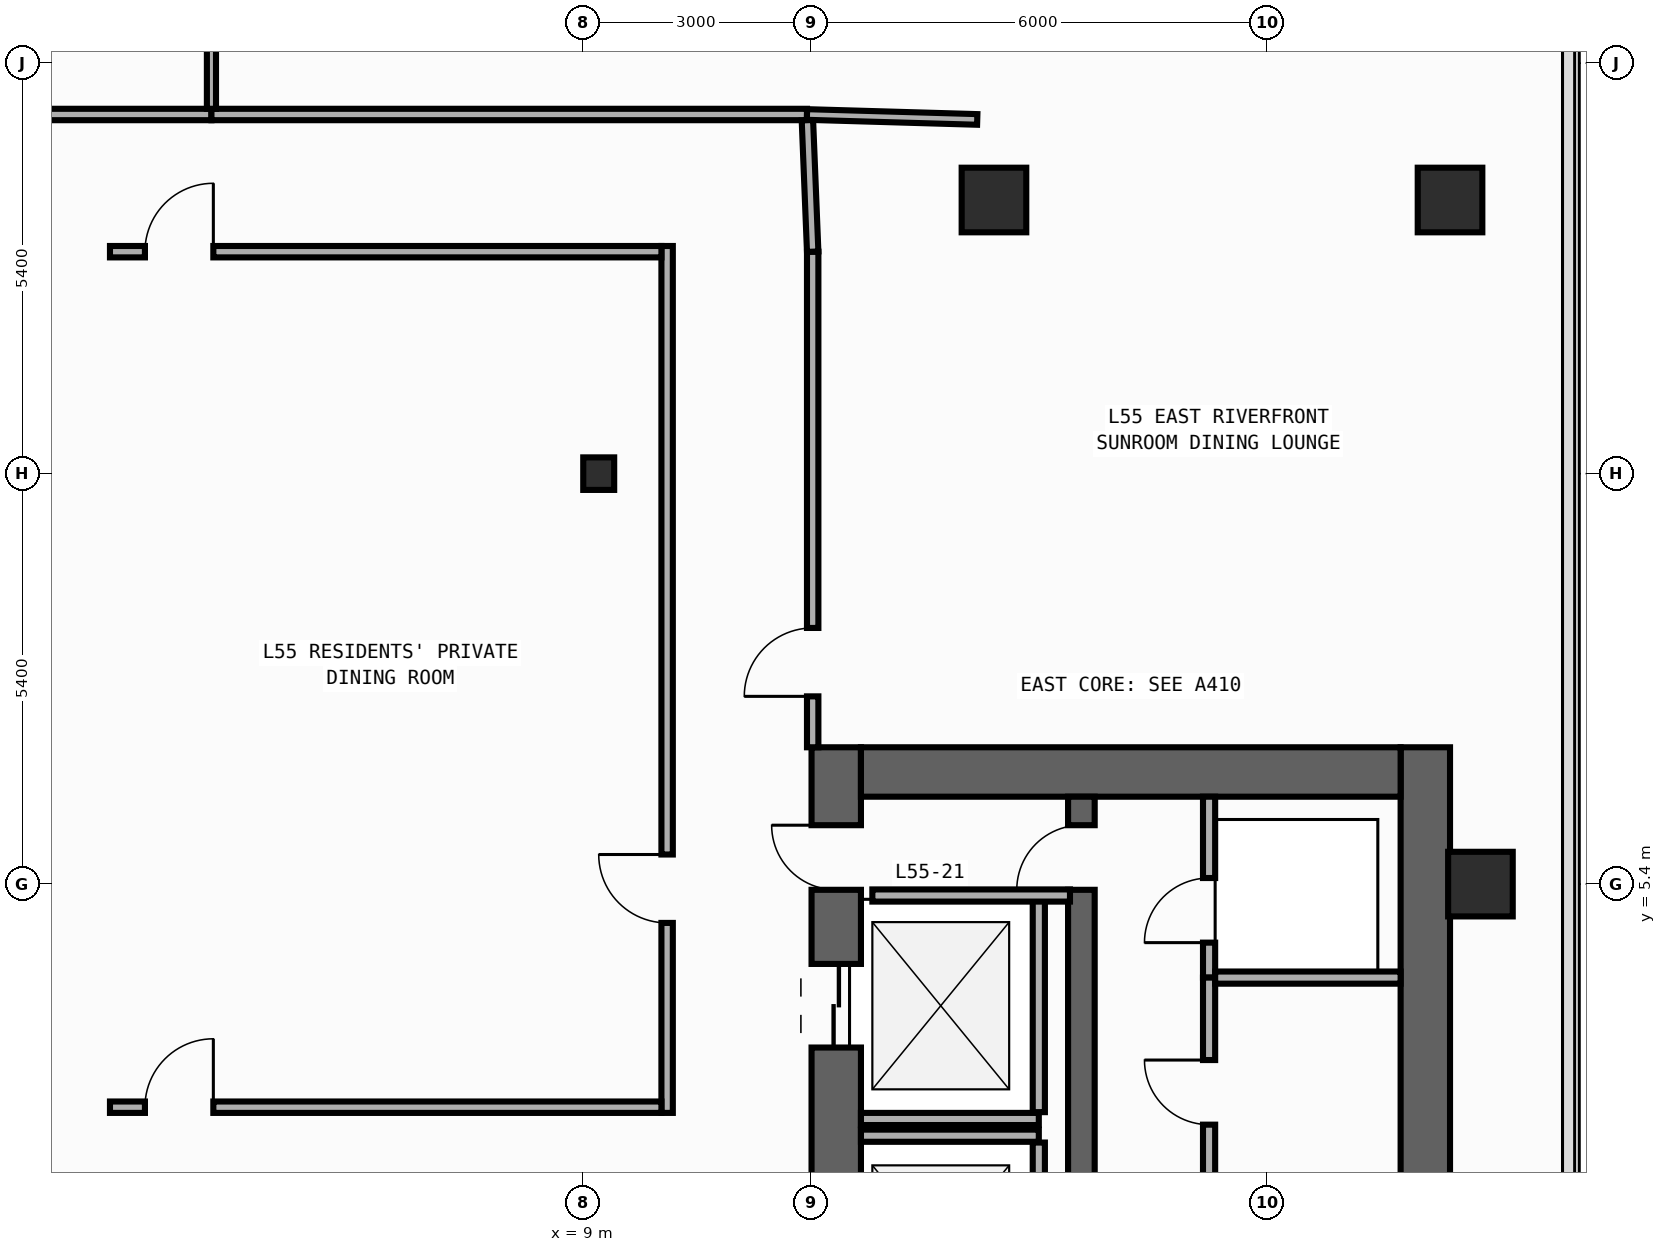
"""IFC4 building model, lengths in metres.
Left out: names, types, materials, properties, quantities, classifications, styles, units other than length and angle.
Written with IfcOpenShell. Run it as: python <this file> out.ifc"""

import sys

from ifc_helpers import new_model, si_unit, direction, frame, frame_2d, origin, origin_2d, place, context, subcontext, project, spatial, rectangle, i_section, extrude, element, fill, save


model = new_model("IFC4")
c1 = context("Model", 3, precision=1e-05, world=origin(), true_north=direction((0.0, 1.0)))
c2 = subcontext(c1, "Body", "Model", "MODEL_VIEW")
j1 = project(units=[si_unit("LENGTHUNIT", "METRE"), si_unit("PLANEANGLEUNIT", "RADIAN")], contexts=[c1])
p1 = place(None, origin())
s1 = spatial("IfcSite", under=j1, at=p1, CompositionType="ELEMENT")
p2 = place(p1, origin())
s2 = spatial("IfcBuilding", under=s1, at=p2, CompositionType="ELEMENT")
p3 = place(p2, frame((0.0, 0.0, 236.8)))
s3 = spatial("IfcBuildingStorey", under=s2, at=p3, CompositionType="ELEMENT", Elevation=236.8)
p4 = place(p3, frame((12.325, -19.8, 0.0), z_axis=(0.0, 0.0, 1.0), x_axis=(0.0, 1.0, 0.0)))
e1 = element("IfcWall", 1, at=p4, inside=s3, PredefinedType="SHEAR", context=c2, shape_type="SweptSolid", body=[
    extrude(rectangle(XDim=27.0, YDim=0.65, at=frame_2d((13.5, 0.0))), origin(), (0.0, 0.0, 1.0), 3.34),
])
p5 = place(p4, frame((23.05, 0.0, 0.0)))
e2 = element("IfcOpeningElement", 2, at=p5, cuts=e1, PredefinedType="OPENING", context=c2, shape_type="SweptSolid", body=[
    extrude(rectangle(XDim=1.1, YDim=2.2, at=frame_2d((0.55, 1.1))), frame((0.0, 0.335, 0.0), z_axis=(0.0, -1.0, 0.0), x_axis=(1.0, 0.0, 0.0)), (0.0, 0.0, 1.0), 0.67),
])
p6 = place(p4, frame((19.85, 0.0, 0.0)))
e3 = element("IfcOpeningElement", 3, at=p6, cuts=e1, PredefinedType="OPENING", context=c2, shape_type="SweptSolid", body=[
    extrude(rectangle(XDim=1.1, YDim=2.2, at=frame_2d((0.55, 1.1))), frame((0.0, 0.335, 0.0), z_axis=(0.0, -1.0, 0.0), x_axis=(1.0, 0.0, 0.0)), (0.0, 0.0, 1.0), 0.67),
])
p7 = place(p4, frame((16.65, 0.0, 0.0)))
e4 = element("IfcOpeningElement", 4, at=p7, cuts=e1, PredefinedType="OPENING", context=c2, shape_type="SweptSolid", body=[
    extrude(rectangle(XDim=1.1, YDim=2.2, at=frame_2d((0.55, 1.1))), frame((0.0, 0.335, 0.0), z_axis=(0.0, -1.0, 0.0), x_axis=(1.0, 0.0, 0.0)), (0.0, 0.0, 1.0), 0.67),
])
p8 = place(p4, frame((10.175, 0.0, 0.0)))
e5 = element("IfcOpeningElement", 5, at=p8, cuts=e1, PredefinedType="OPENING", context=c2, shape_type="SweptSolid", body=[
    extrude(rectangle(XDim=0.85, YDim=2.1, at=frame_2d((0.425, 1.05))), frame((0.0, 0.335, 0.0), z_axis=(0.0, -1.0, 0.0), x_axis=(1.0, 0.0, 0.0)), (0.0, 0.0, 1.0), 0.67),
])
p9 = place(p4, frame((12.725, 0.0, 0.0)))
e6 = element("IfcOpeningElement", 6, at=p9, cuts=e1, PredefinedType="OPENING", context=c2, shape_type="SweptSolid", body=[
    extrude(rectangle(XDim=1.15, YDim=2.2, at=frame_2d((0.575, 1.1))), frame((0.0, 0.335, 0.0), z_axis=(0.0, -1.0, 0.0), x_axis=(1.0, 0.0, 0.0)), (0.0, 0.0, 1.0), 0.67),
])
p10 = place(p4, frame((25.125, 0.0, 0.0)))
e7 = element("IfcOpeningElement", 7, at=p10, cuts=e1, PredefinedType="OPENING", context=c2, shape_type="SweptSolid", body=[
    extrude(rectangle(XDim=0.85, YDim=2.1, at=frame_2d((0.425, 1.05))), frame((0.0, 0.335, 0.0), z_axis=(0.0, -1.0, 0.0), x_axis=(1.0, 0.0, 0.0)), (0.0, 0.0, 1.0), 0.67),
])
p11 = place(p3, frame((20.075, -19.8, 0.0), z_axis=(0.0, 0.0, 1.0), x_axis=(0.0, 1.0, 0.0)))
e8 = element("IfcWall", 8, at=p11, inside=s3, PredefinedType="SHEAR", context=c2, shape_type="SweptSolid", body=[
    extrude(rectangle(XDim=27.0, YDim=0.65, at=frame_2d((13.5, 0.0))), origin(), (0.0, 0.0, 1.0), 3.34),
])
p12 = place(p3, frame((12.65, 6.875, 0.0), z_axis=(0.0, 0.0, 1.0), x_axis=(1.0, 0.0, 0.0)))
e9 = element("IfcWall", 9, at=p12, inside=s3, PredefinedType="SHEAR", context=c2, shape_type="SweptSolid", body=[
    extrude(rectangle(XDim=7.1, YDim=0.65, at=frame_2d((3.55, 0.0))), origin(), (0.0, 0.0, 1.0), 3.34),
])
p13 = place(p3, frame((15.55, -19.15, 0.0), z_axis=(0.0, 0.0, 1.0), x_axis=(0.0, 1.0, 0.0)))
e10 = element("IfcWall", 10, at=p13, inside=s3, PredefinedType="SHEAR", context=c2, shape_type="SweptSolid", body=[
    extrude(rectangle(XDim=25.7, YDim=0.35, at=frame_2d((12.85, 0.0))), origin(), (0.0, 0.0, 1.0), 3.34),
])
p14 = place(p13, frame((12.075, 0.0, 0.0)))
e11 = element("IfcOpeningElement", 11, at=p14, cuts=e10, PredefinedType="OPENING", context=c2, shape_type="SweptSolid", body=[
    extrude(rectangle(XDim=1.15, YDim=2.2, at=frame_2d((0.575, 1.1))), frame((0.0, 0.185, 0.0), z_axis=(0.0, -1.0, 0.0), x_axis=(1.0, 0.0, 0.0)), (0.0, 0.0, 1.0), 0.37),
])
p15 = place(p13, frame((24.475, 0.0, 0.0)))
e12 = element("IfcOpeningElement", 12, at=p15, cuts=e10, PredefinedType="OPENING", context=c2, shape_type="SweptSolid", body=[
    extrude(rectangle(XDim=0.85, YDim=2.1, at=frame_2d((0.425, 1.05))), frame((0.0, 0.185, 0.0), z_axis=(0.0, -1.0, 0.0), x_axis=(1.0, 0.0, 0.0)), (0.0, 0.0, 1.0), 0.37),
])
p16 = place(p3, frame((9.2, 10.8, 0.0), z_axis=(0.0, 0.0, 1.0), x_axis=(1.0, 0.0, 0.0)))
e13 = element("IfcColumn", 13, at=p16, inside=s3, PredefinedType="COLUMN", context=c2, shape_type="SweptSolid", body=[
    extrude(i_section(OverallWidth=0.407, OverallDepth=0.428, WebThickness=0.02, FlangeThickness=0.035, FilletRadius=0.022, at=origin_2d()), origin(), (0.0, 0.0, 1.0), 3.6),
])
for number, where, z_axis, x_axis in (
    (14, (20.4, 14.4, 0.0), (0.0, 0.0, 1.0), (1.0, 0.0, 0.0)),
    (15, (14.4, 14.4, 0.0), (0.0, 0.0, 1.0), (1.0, 0.0, 0.0)),
    (16, (20.8, 5.4, 0.0), (0.0, 0.0, 1.0), (1.0, 0.0, 0.0)),
):
    element("IfcColumn", number, at=place(p3, frame(where, z_axis=z_axis, x_axis=x_axis)), inside=s3, PredefinedType="COLUMN", context=c2, shape_type="SweptSolid", body=[
        extrude(rectangle(XDim=0.85, YDim=0.85, at=origin_2d()), origin(), (0.0, 0.0, 1.0), 3.6),
    ])
p17 = place(p3, frame((12.65, 2.31, 0.0), z_axis=(0.0, 0.0, 1.0), x_axis=(1.0, 0.0, 0.0)))
e17 = element("IfcWall", 17, at=p17, inside=s3, PredefinedType="STANDARD", context=c2, shape_type="SweptSolid", body=[
    extrude(rectangle(XDim=2.34, YDim=0.16, at=frame_2d((1.17, 0.0))), origin(), (0.0, 0.0, 1.0), 3.34),
])
p18 = place(p3, frame((14.99, 2.4, 0.0), z_axis=(0.0, 0.0, 1.0), x_axis=(0.0, 1.0, 0.0)))
e18 = element("IfcWall", 18, at=p18, inside=s3, PredefinedType="STANDARD", context=c2, shape_type="SweptSolid", body=[
    extrude(rectangle(XDim=2.8, YDim=0.16, at=frame_2d((1.4, 0.0))), origin(), (0.0, 0.0, 1.0), 3.34),
])
p19 = place(p3, frame((12.65, 2.09, 0.0), z_axis=(0.0, 0.0, 1.0), x_axis=(1.0, 0.0, 0.0)))
e19 = element("IfcWall", 19, at=p19, inside=s3, PredefinedType="STANDARD", context=c2, shape_type="SweptSolid", body=[
    extrude(rectangle(XDim=2.34, YDim=0.16, at=frame_2d((1.17, 0.0))), origin(), (0.0, 0.0, 1.0), 3.34),
])
p20 = place(p3, frame((14.99, -0.8, 0.0), z_axis=(0.0, 0.0, 1.0), x_axis=(0.0, 1.0, 0.0)))
e20 = element("IfcWall", 20, at=p20, inside=s3, PredefinedType="STANDARD", context=c2, shape_type="SweptSolid", body=[
    extrude(rectangle(XDim=2.8, YDim=0.16, at=frame_2d((1.4, 0.0))), origin(), (0.0, 0.0, 1.0), 3.34),
])
p21 = place(p3, frame((12.8, 5.25, 0.0), z_axis=(0.0, 0.0, 1.0), x_axis=(1.0, 0.0, 0.0)))
e21 = element("IfcWall", 21, at=p21, inside=s3, PredefinedType="STANDARD", context=c2, shape_type="SweptSolid", body=[
    extrude(rectangle(XDim=2.6, YDim=0.16, at=frame_2d((1.3, 0.0))), origin(), (0.0, 0.0, 1.0), 3.34),
])
p22 = place(p3, frame((17.23, 4.17, 0.0), z_axis=(0.0, 0.0, 1.0), x_axis=(0.0, 1.0, 0.0)))
e22 = element("IfcWall", 22, at=p22, inside=s3, PredefinedType="PARTITIONING", context=c2, shape_type="SweptSolid", body=[
    extrude(rectangle(XDim=2.38, YDim=0.16, at=frame_2d((1.19, 0.0))), origin(), (0.0, 0.0, 1.0), 3.34),
])
p23 = place(p22, frame((0.46, 0.0, 0.0)))
e23 = element("IfcOpeningElement", 23, at=p23, cuts=e22, PredefinedType="OPENING", context=c2, shape_type="SweptSolid", body=[
    extrude(rectangle(XDim=0.85, YDim=2.1, at=frame_2d((0.425, 1.05))), frame((0.0, 0.09, 0.0), z_axis=(0.0, -1.0, 0.0), x_axis=(1.0, 0.0, 0.0)), (0.0, 0.0, 1.0), 0.18),
])
p24 = place(p3, frame((17.23, -1.14, 0.0), z_axis=(0.0, 0.0, 1.0), x_axis=(0.0, 1.0, 0.0)))
e24 = element("IfcWall", 24, at=p24, inside=s3, PredefinedType="PARTITIONING", context=c2, shape_type="SweptSolid", body=[
    extrude(rectangle(XDim=5.31, YDim=0.16, at=frame_2d((2.655, 0.0))), origin(), (0.0, 0.0, 1.0), 3.34),
])
p25 = place(p24, frame((3.375, 0.0, 0.0)))
e25 = element("IfcOpeningElement", 25, at=p25, cuts=e24, PredefinedType="OPENING", context=c2, shape_type="SweptSolid", body=[
    extrude(rectangle(XDim=0.85, YDim=2.1, at=frame_2d((0.425, 1.05))), frame((0.0, 0.09, 0.0), z_axis=(0.0, -1.0, 0.0), x_axis=(1.0, 0.0, 0.0)), (0.0, 0.0, 1.0), 0.18),
])
p26 = place(p3, frame((17.31, 4.17, 0.0), z_axis=(0.0, 0.0, 1.0), x_axis=(1.0, 0.0, 0.0)))
e26 = element("IfcWall", 26, at=p26, inside=s3, PredefinedType="PARTITIONING", context=c2, shape_type="SweptSolid", body=[
    extrude(rectangle(XDim=2.44, YDim=0.16, at=frame_2d((1.22, 0.0))), origin(), (0.0, 0.0, 1.0), 3.34),
])
p27 = place(p3, frame((12.015, 7.2, 0.0), z_axis=(0.0, 0.0, 1.0), x_axis=(0.0, 1.0, 0.0)))
e27 = element("IfcWall", 27, at=p27, inside=s3, PredefinedType="PARTITIONING", context=c2, shape_type="SweptSolid", body=[
    extrude(rectangle(XDim=6.52, YDim=0.15, at=frame_2d((3.26, 0.0))), origin(), (0.0, 0.0, 1.0), 3.34),
])
p28 = place(p27, frame((0.67, 0.0, 0.0)))
e28 = element("IfcOpeningElement", 28, at=p28, cuts=e27, PredefinedType="OPENING", context=c2, shape_type="SweptSolid", body=[
    extrude(rectangle(XDim=0.9, YDim=2.15, at=frame_2d((0.45, 1.075))), frame((0.0, 0.085, 0.0), z_axis=(0.0, -1.0, 0.0), x_axis=(1.0, 0.0, 0.0)), (0.0, 0.0, 1.0), 0.17),
])
p29 = place(p3, frame((10.1, 2.39, 0.0), z_axis=(0.0, 0.0, 1.0), x_axis=(0.0, 1.0, 0.0)))
e29 = element("IfcWall", 29, at=p29, inside=s3, PredefinedType="PARTITIONING", context=c2, shape_type="SweptSolid", body=[
    extrude(rectangle(XDim=11.405, YDim=0.15, at=frame_2d((5.703, 0.0))), origin(), (0.0, 0.0, 1.0), 3.34),
])
p30 = place(p29, frame((2.5, 0.0, 0.0)))
e30 = element("IfcOpeningElement", 30, at=p30, cuts=e29, PredefinedType="OPENING", context=c2, shape_type="SweptSolid", body=[
    extrude(rectangle(XDim=0.9, YDim=2.15, at=frame_2d((0.45, 1.075))), frame((0.0, 0.085, 0.0), z_axis=(0.0, -1.0, 0.0), x_axis=(1.0, 0.0, 0.0)), (0.0, 0.0, 1.0), 0.17),
])
p31 = place(p3, frame((2.77, 2.465, 0.0), z_axis=(0.0, 0.0, 1.0), x_axis=(1.0, 0.0, 0.0)))
e31 = element("IfcWall", 31, at=p31, inside=s3, PredefinedType="PARTITIONING", context=c2, shape_type="SweptSolid", body=[
    extrude(rectangle(XDim=7.255, YDim=0.15, at=frame_2d((3.627, 0.0))), origin(), (0.0, 0.0, 1.0), 3.34),
])
p32 = place(p31, frame((0.46, 0.0, 0.0)))
e32 = element("IfcOpeningElement", 32, at=p32, cuts=e31, PredefinedType="OPENING", context=c2, shape_type="SweptSolid", body=[
    extrude(rectangle(XDim=0.9, YDim=2.15, at=frame_2d((0.45, 1.075))), frame((0.0, 0.085, 0.0), z_axis=(0.0, -1.0, 0.0), x_axis=(1.0, 0.0, 0.0)), (0.0, 0.0, 1.0), 0.17),
])
p33 = place(p3, frame((-5.81, 15.525, 0.0), z_axis=(0.0, 0.0, 1.0), x_axis=(1.0, 0.0, 0.0)))
e33 = element("IfcWall", 33, at=p33, inside=s3, PredefinedType="PARTITIONING", context=c2, shape_type="SweptSolid", body=[
    extrude(rectangle(XDim=9.915, YDim=0.15, at=frame_2d((4.958, 0.0))), origin(), (0.0, 0.0, 1.0), 3.34),
])
p34 = place(p3, frame((4.105, 15.525, 0.0), z_axis=(0.0, 0.0, 1.0), x_axis=(1.0, 0.0, 0.0)))
e34 = element("IfcWall", 34, at=p34, inside=s3, PredefinedType="PARTITIONING", context=c2, shape_type="SweptSolid", body=[
    extrude(rectangle(XDim=7.835, YDim=0.15, at=frame_2d((3.917, 0.0))), origin(), (0.0, 0.0, 1.0), 3.34),
])
p35 = place(p3, frame((12.015, 13.72, 0.0), z_axis=(0.0, 0.0, 1.0), x_axis=(-0.040046877756, 0.99919780203, 0.0)))
e35 = element("IfcWall", 35, at=p35, inside=s3, PredefinedType="PARTITIONING", context=c2, shape_type="SweptSolid", body=[
    extrude(rectangle(XDim=1.731, YDim=0.15, at=frame_2d((0.866, 0.0))), origin(), (0.0, 0.0, 1.0), 3.34),
])
p36 = place(p3, frame((2.77, 13.72, 0.0), z_axis=(0.0, 0.0, 1.0), x_axis=(1.0, 0.0, 0.0)))
e36 = element("IfcWall", 36, at=p36, inside=s3, PredefinedType="PARTITIONING", context=c2, shape_type="SweptSolid", body=[
    extrude(rectangle(XDim=7.255, YDim=0.15, at=frame_2d((3.627, 0.0))), origin(), (0.0, 0.0, 1.0), 3.34),
])
p37 = place(p36, frame((0.46, 0.0, 0.0)))
e37 = element("IfcOpeningElement", 37, at=p37, cuts=e36, PredefinedType="OPENING", context=c2, shape_type="SweptSolid", body=[
    extrude(rectangle(XDim=0.9, YDim=2.15, at=frame_2d((0.45, 1.075))), frame((0.0, 0.085, 0.0), z_axis=(0.0, -1.0, 0.0), x_axis=(1.0, 0.0, 0.0)), (0.0, 0.0, 1.0), 0.17),
])
p38 = place(p3, frame((4.105, 15.6, 0.0), z_axis=(0.0, 0.0, 1.0), x_axis=(0.0, 1.0, 0.0)))
e38 = element("IfcWall", 38, at=p38, inside=s3, PredefinedType="PARTITIONING", context=c2, shape_type="SweptSolid", body=[
    extrude(rectangle(XDim=9.255, YDim=0.12, at=frame_2d((4.627, 0.0))), origin(), (0.0, 0.0, 1.0), 3.34),
])
p39 = place(p38, frame((7.995, 0.0, 0.0)))
e39 = element("IfcOpeningElement", 39, at=p39, cuts=e38, PredefinedType="OPENING", context=c2, shape_type="SweptSolid", body=[
    extrude(rectangle(XDim=0.8, YDim=2.1, at=frame_2d((0.4, 1.05))), frame((0.0, 0.07, 0.0), z_axis=(0.0, -1.0, 0.0), x_axis=(1.0, 0.0, 0.0)), (0.0, 0.0, 1.0), 0.14),
])
p40 = place(p3, frame((11.94, 15.525, 0.0), z_axis=(0.0, 0.0, 1.0), x_axis=(0.99958000177, -0.028979649098, 0.0)))
e40 = element("IfcWall", 40, at=p40, inside=s3, PredefinedType="PARTITIONING", context=c2, shape_type="SweptSolid", body=[
    extrude(rectangle(XDim=2.241, YDim=0.14, at=frame_2d((1.121, 0.0))), origin(), (0.0, 0.0, 1.0), 3.34),
])
p41 = place(p5, origin())
e41 = element("IfcDoor", 41, at=p41, inside=s3, OperationType="DOUBLE_DOOR_SLIDING", PredefinedType="DOOR", context=c2, shape_type="SweptSolid", body=[
    extrude(rectangle(XDim=1.1, YDim=2.2, at=frame_2d((0.55, 1.1))), frame((0.0, 0.025, 0.0), z_axis=(0.0, -1.0, 0.0), x_axis=(1.0, 0.0, 0.0)), (0.0, 0.0, 1.0), 0.05),
])
fill(e2, e41)
p42 = place(p10, origin())
e42 = element("IfcDoor", 42, at=p42, inside=s3, OperationType="SINGLE_SWING_RIGHT", PredefinedType="DOOR", context=c2, shape_type="SweptSolid", body=[
    extrude(rectangle(XDim=0.85, YDim=2.1, at=frame_2d((0.425, 1.05))), frame((0.0, 0.025, 0.0), z_axis=(0.0, -1.0, 0.0), x_axis=(1.0, 0.0, 0.0)), (0.0, 0.0, 1.0), 0.05),
])
fill(e7, e42)
p43 = place(p15, origin())
e43 = element("IfcDoor", 43, at=p43, inside=s3, OperationType="SINGLE_SWING_LEFT", PredefinedType="DOOR", context=c2, shape_type="SweptSolid", body=[
    extrude(rectangle(XDim=0.85, YDim=2.1, at=frame_2d((0.425, 1.05))), frame((0.0, 0.025, 0.0), z_axis=(0.0, -1.0, 0.0), x_axis=(1.0, 0.0, 0.0)), (0.0, 0.0, 1.0), 0.05),
])
fill(e12, e43)
p44 = place(p23, origin())
e44 = element("IfcDoor", 44, at=p44, inside=s3, OperationType="SINGLE_SWING_LEFT", PredefinedType="DOOR", context=c2, shape_type="SweptSolid", body=[
    extrude(rectangle(XDim=0.85, YDim=2.1, at=frame_2d((0.425, 1.05))), frame((0.0, 0.025, 0.0), z_axis=(0.0, -1.0, 0.0), x_axis=(1.0, 0.0, 0.0)), (0.0, 0.0, 1.0), 0.05),
])
fill(e23, e44)
p45 = place(p25, origin())
e45 = element("IfcDoor", 45, at=p45, inside=s3, OperationType="SINGLE_SWING_RIGHT", PredefinedType="DOOR", context=c2, shape_type="SweptSolid", body=[
    extrude(rectangle(XDim=0.85, YDim=2.1, at=frame_2d((0.425, 1.05))), frame((0.0, 0.025, 0.0), z_axis=(0.0, -1.0, 0.0), x_axis=(1.0, 0.0, 0.0)), (0.0, 0.0, 1.0), 0.05),
])
fill(e25, e45)
p46 = place(p28, origin())
e46 = element("IfcDoor", 46, at=p46, inside=s3, OperationType="SINGLE_SWING_LEFT", PredefinedType="DOOR", context=c2, shape_type="SweptSolid", body=[
    extrude(rectangle(XDim=0.9, YDim=2.15, at=frame_2d((0.45, 1.075))), frame((0.0, 0.025, 0.0), z_axis=(0.0, -1.0, 0.0), x_axis=(1.0, 0.0, 0.0)), (0.0, 0.0, 1.0), 0.05),
])
fill(e28, e46)
p47 = place(p30, origin())
e47 = element("IfcDoor", 47, at=p47, inside=s3, OperationType="SINGLE_SWING_RIGHT", PredefinedType="DOOR", context=c2, shape_type="SweptSolid", body=[
    extrude(rectangle(XDim=0.9, YDim=2.15, at=frame_2d((0.45, 1.075))), frame((0.0, 0.025, 0.0), z_axis=(0.0, -1.0, 0.0), x_axis=(1.0, 0.0, 0.0)), (0.0, 0.0, 1.0), 0.05),
])
fill(e30, e47)
p48 = place(p32, origin())
e48 = element("IfcDoor", 48, at=p48, inside=s3, OperationType="SINGLE_SWING_RIGHT", PredefinedType="DOOR", context=c2, shape_type="SweptSolid", body=[
    extrude(rectangle(XDim=0.9, YDim=2.15, at=frame_2d((0.45, 1.075))), frame((0.0, 0.025, 0.0), z_axis=(0.0, -1.0, 0.0), x_axis=(1.0, 0.0, 0.0)), (0.0, 0.0, 1.0), 0.05),
])
fill(e32, e48)
p49 = place(p37, origin())
e49 = element("IfcDoor", 49, at=p49, inside=s3, OperationType="SINGLE_SWING_RIGHT", PredefinedType="DOOR", context=c2, shape_type="SweptSolid", body=[
    extrude(rectangle(XDim=0.9, YDim=2.15, at=frame_2d((0.45, 1.075))), frame((0.0, 0.025, 0.0), z_axis=(0.0, -1.0, 0.0), x_axis=(1.0, 0.0, 0.0)), (0.0, 0.0, 1.0), 0.05),
])
fill(e37, e49)
save(model, sys.argv[1])
